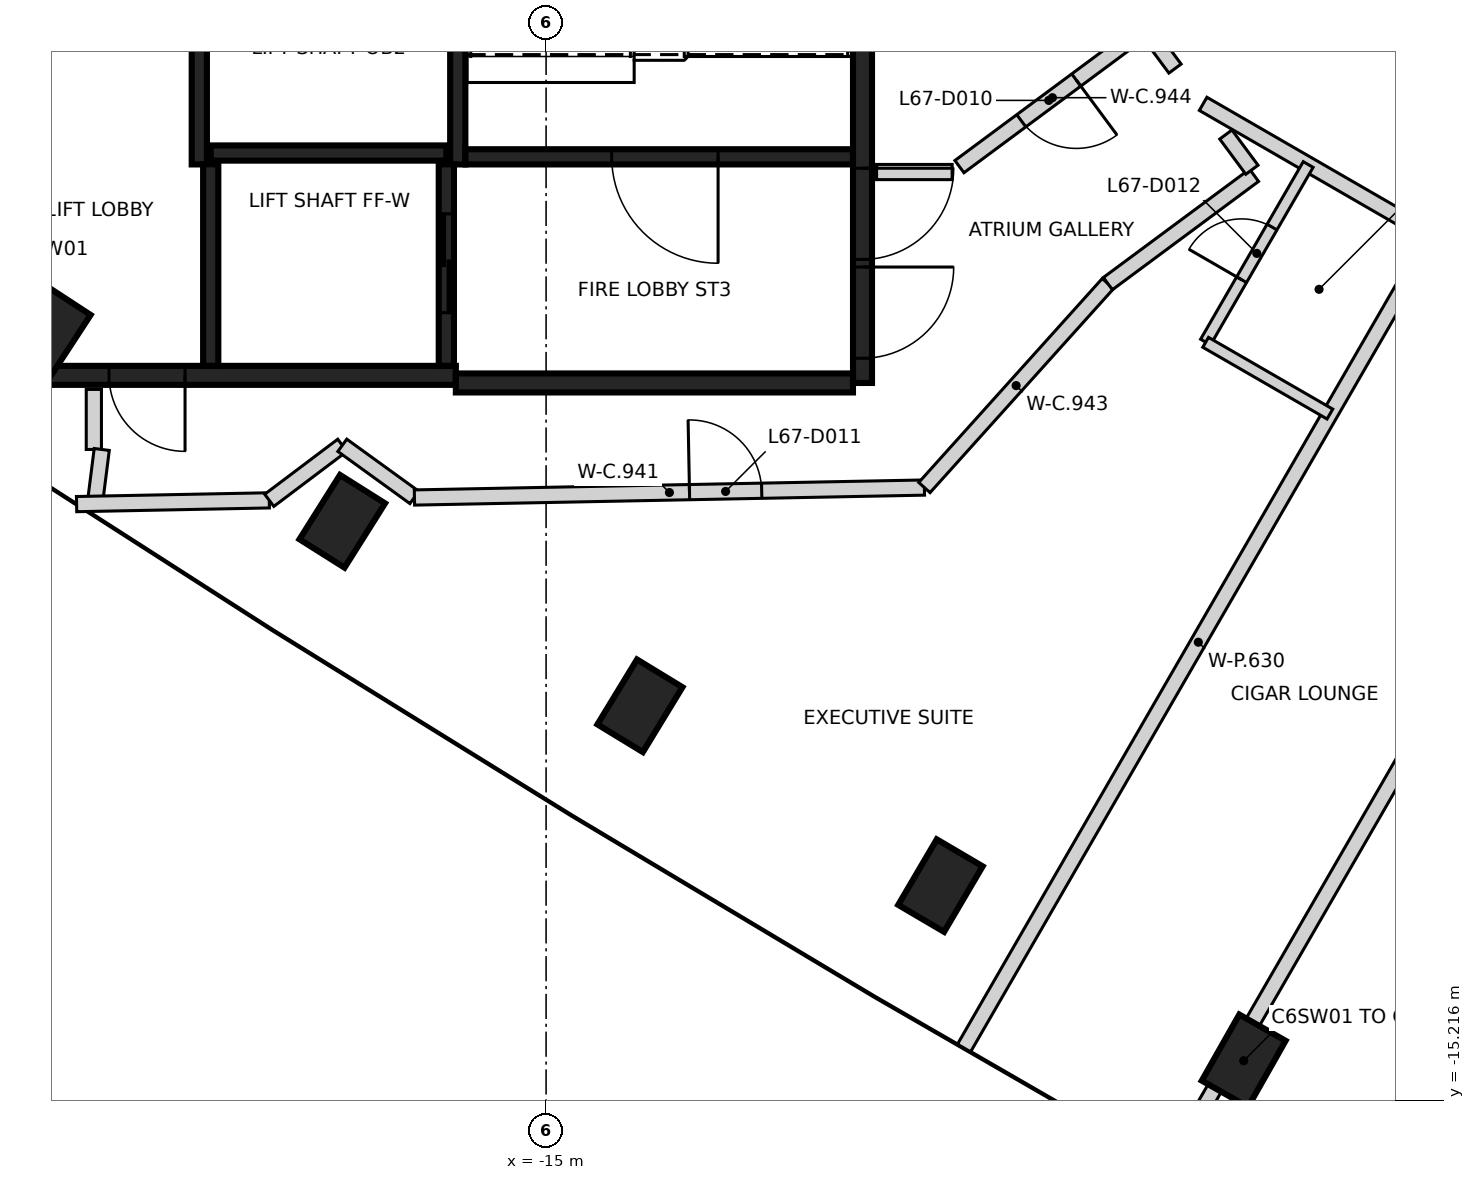
"""IFC4 building model, lengths in metres.
Left out: names, types, materials, properties, quantities, classifications, styles, units other than length and angle.
Written with IfcOpenShell. Run it as: python <this file> out.ifc"""

import sys

from ifc_helpers import new_model, si_unit, direction, frame, frame_2d, origin, origin_2d, place, context, subcontext, project, spatial, rectangle, extrude, element, fill, save


model = new_model("IFC4")
c1 = context("Model", 3, precision=1e-05, world=origin(), true_north=direction((0.0, 1.0)))
c2 = subcontext(c1, "Body", "Model", "MODEL_VIEW")
j1 = project(units=[si_unit("LENGTHUNIT", "METRE"), si_unit("PLANEANGLEUNIT", "RADIAN")], contexts=[c1])
p1 = place(None, origin())
s1 = spatial("IfcSite", under=j1, at=p1, CompositionType="ELEMENT")
p2 = place(p1, origin())
s2 = spatial("IfcBuilding", under=s1, at=p2, CompositionType="ELEMENT")
p3 = place(p2, frame((0.0, 0.0, 265.8)))
s3 = spatial("IfcBuildingStorey", under=s2, at=p3, CompositionType="ELEMENT", Elevation=265.8)
for number, where, z_axis, x_axis in (
    (1, (-21.559, -5.107, -0.35), (0.0, 0.0, 1.0), (0.547, 0.837, 0.0)),
    (2, (-17.681, -7.595, -0.35), (0.0, 0.0, 1.0), (0.533, 0.846, 0.0)),
    (3, (-13.765, -10.022, -0.35), (0.0, 0.0, 1.0), (0.52, 0.854, 0.0)),
    (4, (-9.812, -12.388, -0.35), (0.0, 0.0, 1.0), (0.507, 0.862, 0.0)),
    (5, (-5.822, -14.691, -0.35), (0.0, 0.0, 1.0), (0.493, 0.87, 0.0)),
):
    element("IfcColumn", number, at=place(p3, frame(where, z_axis=z_axis, x_axis=x_axis)), inside=s3, PredefinedType="COLUMN", context=c2, shape_type="SweptSolid", body=[
        extrude(rectangle(XDim=1.0, YDim=0.7, at=origin_2d()), origin(), (0.0, 0.0, 1.0), 3.6),
    ])
p4 = place(p3, frame((-10.837, 5.775, 0.0), z_axis=(0.0, 0.0, 1.0), x_axis=(0.0, -1.0, 0.0)))
e6 = element("IfcWall", 6, at=p4, inside=s3, PredefinedType="SHEAR", context=c2, shape_type="SweptSolid", body=[
    extrude(rectangle(XDim=11.55, YDim=0.25, at=frame_2d((5.775, 0.0))), origin(), (0.0, 0.0, 1.0), 3.25),
])
p5 = place(p4, frame((10.025, 0.0, 0.0)))
e7 = element("IfcOpeningElement", 7, at=p5, cuts=e6, PredefinedType="OPENING", context=c2, shape_type="SweptSolid", body=[
    extrude(rectangle(XDim=1.2, YDim=2.1, at=frame_2d((0.6, 1.05))), frame((0.0, 0.135, 0.0), z_axis=(0.0, -1.0, 0.0), x_axis=(1.0, 0.0, 0.0)), (0.0, 0.0, 1.0), 0.27),
])
p6 = place(p4, frame((8.725, 0.0, 0.0)))
e8 = element("IfcOpeningElement", 8, at=p6, cuts=e6, PredefinedType="OPENING", context=c2, shape_type="SweptSolid", body=[
    extrude(rectangle(XDim=1.2, YDim=2.1, at=frame_2d((0.6, 1.05))), frame((0.0, 0.135, 0.0), z_axis=(0.0, -1.0, 0.0), x_axis=(1.0, 0.0, 0.0)), (0.0, 0.0, 1.0), 0.27),
])
p7 = place(p3, frame((-16.187, -5.675, 0.0), z_axis=(0.0, 0.0, 1.0), x_axis=(-1.0, 0.0, 0.0)))
e9 = element("IfcWall", 9, at=p7, inside=s3, PredefinedType="SHEAR", context=c2, shape_type="SweptSolid", body=[
    extrude(rectangle(XDim=6.125, YDim=0.25, at=frame_2d((3.062, 0.0))), origin(), (0.0, 0.0, 1.0), 3.25),
])
p8 = place(p7, frame((3.563, 0.0, 0.0)))
e10 = element("IfcOpeningElement", 10, at=p8, cuts=e9, PredefinedType="OPENING", context=c2, shape_type="SweptSolid", body=[
    extrude(rectangle(XDim=1.0, YDim=2.1, at=frame_2d((0.5, 1.05))), frame((0.0, 0.135, 0.0), z_axis=(0.0, -1.0, 0.0), x_axis=(1.0, 0.0, 0.0)), (0.0, 0.0, 1.0), 0.27),
])
p9 = place(p3, frame((-10.963, -5.775, 0.0), z_axis=(0.0, 0.0, 1.0), x_axis=(-1.0, 0.0, 0.0)))
e11 = element("IfcWall", 11, at=p9, inside=s3, PredefinedType="SHEAR", context=c2, shape_type="SweptSolid", body=[
    extrude(rectangle(XDim=5.225, YDim=0.25, at=frame_2d((2.612, 0.0))), origin(), (0.0, 0.0, 1.0), 3.25),
])
p10 = place(p3, frame((-16.162, 3.074, 0.0), z_axis=(0.0, 0.0, 1.0), x_axis=(0.0, -1.0, 0.0)))
e12 = element("IfcWall", 12, at=p10, inside=s3, PredefinedType="SHEAR", context=c2, shape_type="SweptSolid", body=[
    extrude(rectangle(XDim=5.974, YDim=0.2, at=frame_2d((2.987, 0.0))), origin(), (0.0, 0.0, 1.0), 3.25),
])
p11 = place(p3, frame((-19.562, -2.9, 0.0), z_axis=(0.0, 0.0, 1.0), x_axis=(0.0, 1.0, 0.0)))
e13 = element("IfcWall", 13, at=p11, inside=s3, PredefinedType="SHEAR", context=c2, shape_type="SweptSolid", body=[
    extrude(rectangle(XDim=6.1, YDim=0.2, at=frame_2d((3.05, 0.0))), origin(), (0.0, 0.0, 1.0), 3.25),
])
p12 = place(p3, frame((-10.963, -2.8, 0.0), z_axis=(0.0, 0.0, 1.0), x_axis=(-1.0, 0.0, 0.0)))
e14 = element("IfcWall", 14, at=p12, inside=s3, PredefinedType="SHEAR", context=c2, shape_type="SweptSolid", body=[
    extrude(rectangle(XDim=5.098, YDim=0.2, at=frame_2d((2.549, 0.0))), origin(), (0.0, 0.0, 1.0), 3.25),
])
p13 = place(p12, frame((1.774, 0.0, 0.0)))
e15 = element("IfcOpeningElement", 15, at=p13, cuts=e14, PredefinedType="OPENING", context=c2, shape_type="SweptSolid", body=[
    extrude(rectangle(XDim=1.4, YDim=2.1, at=frame_2d((0.7, 1.05))), frame((0.0, 0.11, 0.0), z_axis=(0.0, -1.0, 0.0), x_axis=(1.0, 0.0, 0.0)), (0.0, 0.0, 1.0), 0.22),
])
p14 = place(p3, frame((-19.412, -2.75, 0.0), z_axis=(0.0, 0.0, 1.0), x_axis=(1.0, 0.0, 0.0)))
e16 = element("IfcWall", 16, at=p14, inside=s3, PredefinedType="SHEAR", context=c2, shape_type="SweptSolid", body=[
    extrude(rectangle(XDim=3.1, YDim=0.2, at=frame_2d((1.55, 0.0))), origin(), (0.0, 0.0, 1.0), 3.25),
])
p15 = place(p3, frame((-16.312, -2.898, 0.0), z_axis=(0.0, 0.0, 1.0), x_axis=(0.0, -1.0, 0.0)))
e17 = element("IfcWall", 17, at=p15, inside=s3, PredefinedType="SHEAR", context=c2, shape_type="SweptSolid", body=[
    extrude(rectangle(XDim=2.651, YDim=0.2, at=frame_2d((1.325, 0.0))), origin(), (0.0, 0.0, 1.0), 3.25),
])
p16 = place(p15, frame((0.652, 0.0, 0.0)))
e18 = element("IfcOpeningElement", 18, at=p16, cuts=e17, PredefinedType="OPENING", context=c2, shape_type="SweptSolid", body=[
    extrude(rectangle(XDim=1.3, YDim=2.1, at=frame_2d((0.65, 1.05))), frame((0.0, 0.11, 0.0), z_axis=(0.0, -1.0, 0.0), x_axis=(1.0, 0.0, 0.0)), (0.0, 0.0, 1.0), 0.22),
])
p17 = place(p3, frame((-19.412, -5.549, 0.0), z_axis=(0.0, 0.0, 1.0), x_axis=(0.0, 1.0, 0.0)))
e19 = element("IfcWall", 19, at=p17, inside=s3, PredefinedType="SHEAR", context=c2, shape_type="SweptSolid", body=[
    extrude(rectangle(XDim=2.651, YDim=0.2, at=frame_2d((1.325, 0.0))), origin(), (0.0, 0.0, 1.0), 3.25),
])
p18 = place(p3, frame((-20.95, -6.65, 0.0), z_axis=(0.0, 0.0, 1.0), x_axis=(0.0, 1.0, 0.0)))
e20 = element("IfcWall", 20, at=p18, inside=s3, PredefinedType="PARTITIONING", context=c2, shape_type="SweptSolid", body=[
    extrude(rectangle(XDim=0.79, YDim=0.2, at=frame_2d((0.395, 0.0))), origin(), (0.0, 0.0, 1.0), 3.25),
])
p19 = place(p3, frame((-20.929, -7.306, 0.0), z_axis=(0.0, 0.0, 1.0), x_axis=(0.125534186853, 0.992089294334, 0.0)))
e21 = element("IfcWall", 21, at=p19, inside=s3, PredefinedType="PARTITIONING", context=c2, shape_type="SweptSolid", body=[
    extrude(rectangle(XDim=0.661, YDim=0.2, at=frame_2d((0.331, 0.0))), origin(), (0.0, 0.0, 1.0), 3.25),
])
p20 = place(p3, frame((-21.177, -7.369, 0.0), z_axis=(0.0, 0.0, 1.0), x_axis=(0.999808930271, 0.019547453804, 0.0)))
e22 = element("IfcWall", 22, at=p20, inside=s3, PredefinedType="PARTITIONING", context=c2, shape_type="SweptSolid", body=[
    extrude(rectangle(XDim=2.535, YDim=0.2, at=frame_2d((1.268, 0.0))), origin(), (0.0, 0.0, 1.0), 3.25),
])
p21 = place(p3, frame((-18.642, -7.319, 0.0), z_axis=(0.0, 0.0, 1.0), x_axis=(0.798707882989, 0.601718968998, 0.0)))
e23 = element("IfcWall", 23, at=p21, inside=s3, PredefinedType="PARTITIONING", context=c2, shape_type="SweptSolid", body=[
    extrude(rectangle(XDim=1.203, YDim=0.2, at=frame_2d((0.602, 0.0))), origin(), (0.0, 0.0, 1.0), 2.35),
])
p22 = place(p3, frame((-17.681, -6.595, 0.0), z_axis=(0.0, 0.0, 1.0), x_axis=(0.810123213102, -0.586259652026, 0.0)))
e24 = element("IfcWall", 24, at=p22, inside=s3, PredefinedType="PARTITIONING", context=c2, shape_type="SweptSolid", body=[
    extrude(rectangle(XDim=1.17, YDim=0.2, at=frame_2d((0.585, 0.0))), origin(), (0.0, 0.0, 1.0), 3.25),
])
p23 = place(p3, frame((-16.732, -7.282, 0.0), z_axis=(0.0, 0.0, 1.0), x_axis=(0.999809119854, 0.019537754635, 0.0)))
e25 = element("IfcWall", 25, at=p23, inside=s3, PredefinedType="PARTITIONING", context=c2, shape_type="SweptSolid", body=[
    extrude(rectangle(XDim=6.71, YDim=0.2, at=frame_2d((3.355, 0.0))), origin(), (0.0, 0.0, 1.0), 3.25),
])
p24 = place(p23, frame((3.619, 0.0, 0.0)))
e26 = element("IfcOpeningElement", 26, at=p24, cuts=e25, PredefinedType="OPENING", context=c2, shape_type="SweptSolid", body=[
    extrude(rectangle(XDim=0.95, YDim=2.1, at=frame_2d((0.475, 1.05))), frame((0.0, 0.11, 0.0), z_axis=(0.0, -1.0, 0.0), x_axis=(1.0, 0.0, 0.0)), (0.0, 0.0, 1.0), 0.22),
])
p25 = place(p3, frame((-10.652, -3.0, 0.0), z_axis=(0.0, 0.0, 1.0), x_axis=(1.0, 0.0, 0.0)))
e27 = element("IfcWall", 27, at=p25, inside=s3, PredefinedType="PARTITIONING", context=c2, shape_type="SweptSolid", body=[
    extrude(rectangle(XDim=0.994, YDim=0.2, at=frame_2d((0.497, 0.0))), origin(), (0.0, 0.0, 1.0), 3.25),
])
p26 = place(p3, frame((-10.023, -7.151, 0.0), z_axis=(0.0, 0.0, 1.0), x_axis=(0.668886243279, 0.743364778256, 0.0)))
e28 = element("IfcWall", 28, at=p26, inside=s3, PredefinedType="PARTITIONING", context=c2, shape_type="SweptSolid", body=[
    extrude(rectangle(XDim=3.609, YDim=0.2, at=frame_2d((1.805, 0.0))), origin(), (0.0, 0.0, 1.0), 3.25),
])
p27 = place(p3, frame((-7.115, -1.115, 0.0), z_axis=(0.0, 0.0, 1.0), x_axis=(-0.803344165632, -0.595515030495, 0.0)))
e29 = element("IfcWall", 29, at=p27, inside=s3, PredefinedType="PARTITIONING", context=c2, shape_type="SweptSolid", body=[
    extrude(rectangle(XDim=3.046, YDim=0.2, at=frame_2d((1.523, 0.0))), origin(), (0.0, 0.0, 1.0), 3.25),
])
p28 = place(p27, frame((1.133, 0.0, 0.0)))
e30 = element("IfcOpeningElement", 30, at=p28, cuts=e29, PredefinedType="OPENING", context=c2, shape_type="SweptSolid", body=[
    extrude(rectangle(XDim=0.9, YDim=2.1, at=frame_2d((0.45, 1.05))), frame((0.0, 0.11, 0.0), z_axis=(0.0, -1.0, 0.0), x_axis=(1.0, 0.0, 0.0)), (0.0, 0.0, 1.0), 0.22),
])
p29 = place(p3, frame((-7.609, -4.468, 0.0), z_axis=(0.0, 0.0, 1.0), x_axis=(0.803414413351, 0.595420255298, 0.0)))
e31 = element("IfcWall", 31, at=p29, inside=s3, PredefinedType="PARTITIONING", context=c2, shape_type="SweptSolid", body=[
    extrude(rectangle(XDim=2.393, YDim=0.2, at=frame_2d((1.197, 0.0))), origin(), (0.0, 0.0, 1.0), 3.25),
])
p30 = place(p3, frame((-7.114, -1.115, 0.0), z_axis=(0.0, 0.0, 1.0), x_axis=(0.595075286625, -0.803669959155, 0.0)))
e32 = element("IfcWall", 32, at=p30, inside=s3, PredefinedType="PARTITIONING", context=c2, shape_type="SweptSolid", body=[
    extrude(rectangle(XDim=0.652, YDim=0.2, at=frame_2d((0.326, 0.0))), origin(), (0.0, 0.0, 1.0), 3.25),
])
p31 = place(p3, frame((-6.057, -2.507, 0.0), z_axis=(0.0, 0.0, 1.0), x_axis=(0.594974339713, -0.803744695213, 0.0)))
e33 = element("IfcWall", 33, at=p31, inside=s3, PredefinedType="PARTITIONING", context=c2, shape_type="SweptSolid", body=[
    extrude(rectangle(XDim=0.576, YDim=0.2, at=frame_2d((0.288, 0.0))), origin(), (0.0, 0.0, 1.0), 3.25),
])
p32 = place(p3, frame((-6.356, -2.103, 0.0), z_axis=(0.0, 0.0, 1.0), x_axis=(0.865939059902, -0.50014952218, 0.0)))
e34 = element("IfcWall", 34, at=p32, inside=s3, PredefinedType="PARTITIONING", context=c2, shape_type="SweptSolid", body=[
    extrude(rectangle(XDim=8.956, YDim=0.2, at=frame_2d((4.478, 0.0))), origin(), (0.0, 0.0, 1.0), 3.25),
])
p33 = place(p32, frame((4.546, 0.0, 0.0)))
e35 = element("IfcOpeningElement", 35, at=p33, cuts=e34, PredefinedType="OPENING", context=c2, shape_type="SweptSolid", body=[
    extrude(rectangle(XDim=1.0, YDim=2.1, at=frame_2d((0.5, 1.05))), frame((0.0, 0.11, 0.0), z_axis=(0.0, -1.0, 0.0), x_axis=(1.0, 0.0, 0.0)), (0.0, 0.0, 1.0), 0.22),
])
p34 = place(p32, frame((7.275, 0.0, 0.0)))
e36 = element("IfcOpeningElement", 36, at=p34, cuts=e34, PredefinedType="OPENING", context=c2, shape_type="SweptSolid", body=[
    extrude(rectangle(XDim=1.0, YDim=2.1, at=frame_2d((0.5, 1.05))), frame((0.0, 0.11, 0.0), z_axis=(0.0, -1.0, 0.0), x_axis=(1.0, 0.0, 0.0)), (0.0, 0.0, 1.0), 0.22),
])
p35 = place(p3, frame((-9.501, -14.524, 0.0), z_axis=(0.0, 0.0, 1.0), x_axis=(0.499964147476, 0.86604610226, 0.0)))
e37 = element("IfcWall", 37, at=p35, inside=s3, PredefinedType="PARTITIONING", context=c2, shape_type="SweptSolid", body=[
    extrude(rectangle(XDim=12.329, YDim=0.2, at=frame_2d((6.165, 0.0))), origin(), (0.0, 0.0, 1.0), 2.35),
])
p36 = place(p3, frame((-6.8, -16.084, 0.0), z_axis=(0.0, 0.0, 1.0), x_axis=(0.500002425662, 0.866024003323, 0.0)))
e38 = element("IfcWall", 38, at=p36, inside=s3, PredefinedType="PARTITIONING", context=c2, shape_type="SweptSolid", body=[
    extrude(rectangle(XDim=12.329, YDim=0.2, at=frame_2d((6.165, 0.0))), origin(), (0.0, 0.0, 1.0), 3.25),
])
p37 = place(p3, frame((-6.324, -5.237, 0.0), z_axis=(0.0, 0.0, 1.0), x_axis=(0.500294180644, 0.865855491877, 0.0)))
e39 = element("IfcWall", 39, at=p37, inside=s3, PredefinedType="PARTITIONING", context=c2, shape_type="SweptSolid", body=[
    extrude(rectangle(XDim=2.698, YDim=0.15, at=frame_2d((1.349, 0.0))), origin(), (0.0, 0.0, 1.0), 3.25),
])
p38 = place(p37, frame((0.948, 0.0, 0.0)))
e40 = element("IfcOpeningElement", 40, at=p38, cuts=e39, PredefinedType="OPENING", context=c2, shape_type="SweptSolid", body=[
    extrude(rectangle(XDim=0.8, YDim=2.1, at=frame_2d((0.4, 1.05))), frame((0.0, 0.085, 0.0), z_axis=(0.0, -1.0, 0.0), x_axis=(1.0, 0.0, 0.0)), (0.0, 0.0, 1.0), 0.17),
])
p39 = place(p3, frame((-6.323, -5.24, 0.0), z_axis=(0.0, 0.0, 1.0), x_axis=(0.865998231832, -0.50004706025, 0.0)))
e41 = element("IfcWall", 41, at=p39, inside=s3, PredefinedType="PARTITIONING", context=c2, shape_type="SweptSolid", body=[
    extrude(rectangle(XDim=1.888, YDim=0.15, at=frame_2d((0.944, 0.0))), origin(), (0.0, 0.0, 1.0), 3.25),
])
p40 = place(p16, origin())
e42 = element("IfcDoor", 42, at=p40, inside=s3, OperationType="SLIDING_TO_RIGHT", PredefinedType="DOOR", context=c2, shape_type="SweptSolid", body=[
    extrude(rectangle(XDim=1.3, YDim=2.1, at=frame_2d((0.65, 1.05))), frame((0.0, 0.025, 0.0), z_axis=(0.0, -1.0, 0.0), x_axis=(1.0, 0.0, 0.0)), (0.0, 0.0, 1.0), 0.05),
])
fill(e18, e42)
p41 = place(p8, origin())
e43 = element("IfcDoor", 43, at=p41, inside=s3, OperationType="SINGLE_SWING_LEFT", PredefinedType="DOOR", context=c2, shape_type="SweptSolid", body=[
    extrude(rectangle(XDim=1.0, YDim=2.1, at=frame_2d((0.5, 1.05))), frame((0.0, 0.025, 0.0), z_axis=(0.0, -1.0, 0.0), x_axis=(1.0, 0.0, 0.0)), (0.0, 0.0, 1.0), 0.05),
])
fill(e10, e43)
p42 = place(p5, origin())
e44 = element("IfcDoor", 44, at=p42, inside=s3, OperationType="SINGLE_SWING_LEFT", PredefinedType="DOOR", context=c2, shape_type="SweptSolid", body=[
    extrude(rectangle(XDim=1.2, YDim=2.1, at=frame_2d((0.6, 1.05))), frame((0.0, 0.025, 0.0), z_axis=(0.0, -1.0, 0.0), x_axis=(1.0, 0.0, 0.0)), (0.0, 0.0, 1.0), 0.05),
])
fill(e7, e44)
p43 = place(p6, origin())
e45 = element("IfcDoor", 45, at=p43, inside=s3, OperationType="SINGLE_SWING_RIGHT", PredefinedType="DOOR", context=c2, shape_type="SweptSolid", body=[
    extrude(rectangle(XDim=1.2, YDim=2.1, at=frame_2d((0.6, 1.05))), frame((0.0, 0.025, 0.0), z_axis=(0.0, -1.0, 0.0), x_axis=(1.0, 0.0, 0.0)), (0.0, 0.0, 1.0), 0.05),
])
fill(e8, e45)
p44 = place(p13, origin())
e46 = element("IfcDoor", 46, at=p44, inside=s3, OperationType="SINGLE_SWING_RIGHT", PredefinedType="DOOR", context=c2, shape_type="SweptSolid", body=[
    extrude(rectangle(XDim=1.4, YDim=2.1, at=frame_2d((0.7, 1.05))), frame((0.0, 0.025, 0.0), z_axis=(0.0, -1.0, 0.0), x_axis=(1.0, 0.0, 0.0)), (0.0, 0.0, 1.0), 0.05),
])
fill(e15, e46)
p45 = place(p28, origin())
e47 = element("IfcDoor", 47, at=p45, inside=s3, OperationType="SINGLE_SWING_LEFT", PredefinedType="DOOR", context=c2, shape_type="SweptSolid", body=[
    extrude(rectangle(XDim=0.9, YDim=2.1, at=frame_2d((0.45, 1.05))), frame((0.0, 0.025, 0.0), z_axis=(0.0, -1.0, 0.0), x_axis=(1.0, 0.0, 0.0)), (0.0, 0.0, 1.0), 0.05),
])
fill(e30, e47)
p46 = place(p24, frame((0.95, 0.0, 0.0), z_axis=(0.0, 0.0, 1.0), x_axis=(-1.0, 0.0, 0.0)))
e48 = element("IfcDoor", 48, at=p46, inside=s3, OperationType="SINGLE_SWING_LEFT", PredefinedType="DOOR", context=c2, shape_type="SweptSolid", body=[
    extrude(rectangle(XDim=0.95, YDim=2.1, at=frame_2d((0.475, 1.05))), frame((0.0, 0.025, 0.0), z_axis=(0.0, -1.0, 0.0), x_axis=(1.0, 0.0, 0.0)), (0.0, 0.0, 1.0), 0.05),
])
fill(e26, e48)
p47 = place(p38, origin())
e49 = element("IfcDoor", 49, at=p47, inside=s3, OperationType="SINGLE_SWING_LEFT", PredefinedType="DOOR", context=c2, shape_type="SweptSolid", body=[
    extrude(rectangle(XDim=0.8, YDim=2.1, at=frame_2d((0.4, 1.05))), frame((0.0, 0.025, 0.0), z_axis=(0.0, -1.0, 0.0), x_axis=(1.0, 0.0, 0.0)), (0.0, 0.0, 1.0), 0.05),
])
fill(e40, e49)
save(model, sys.argv[1])
